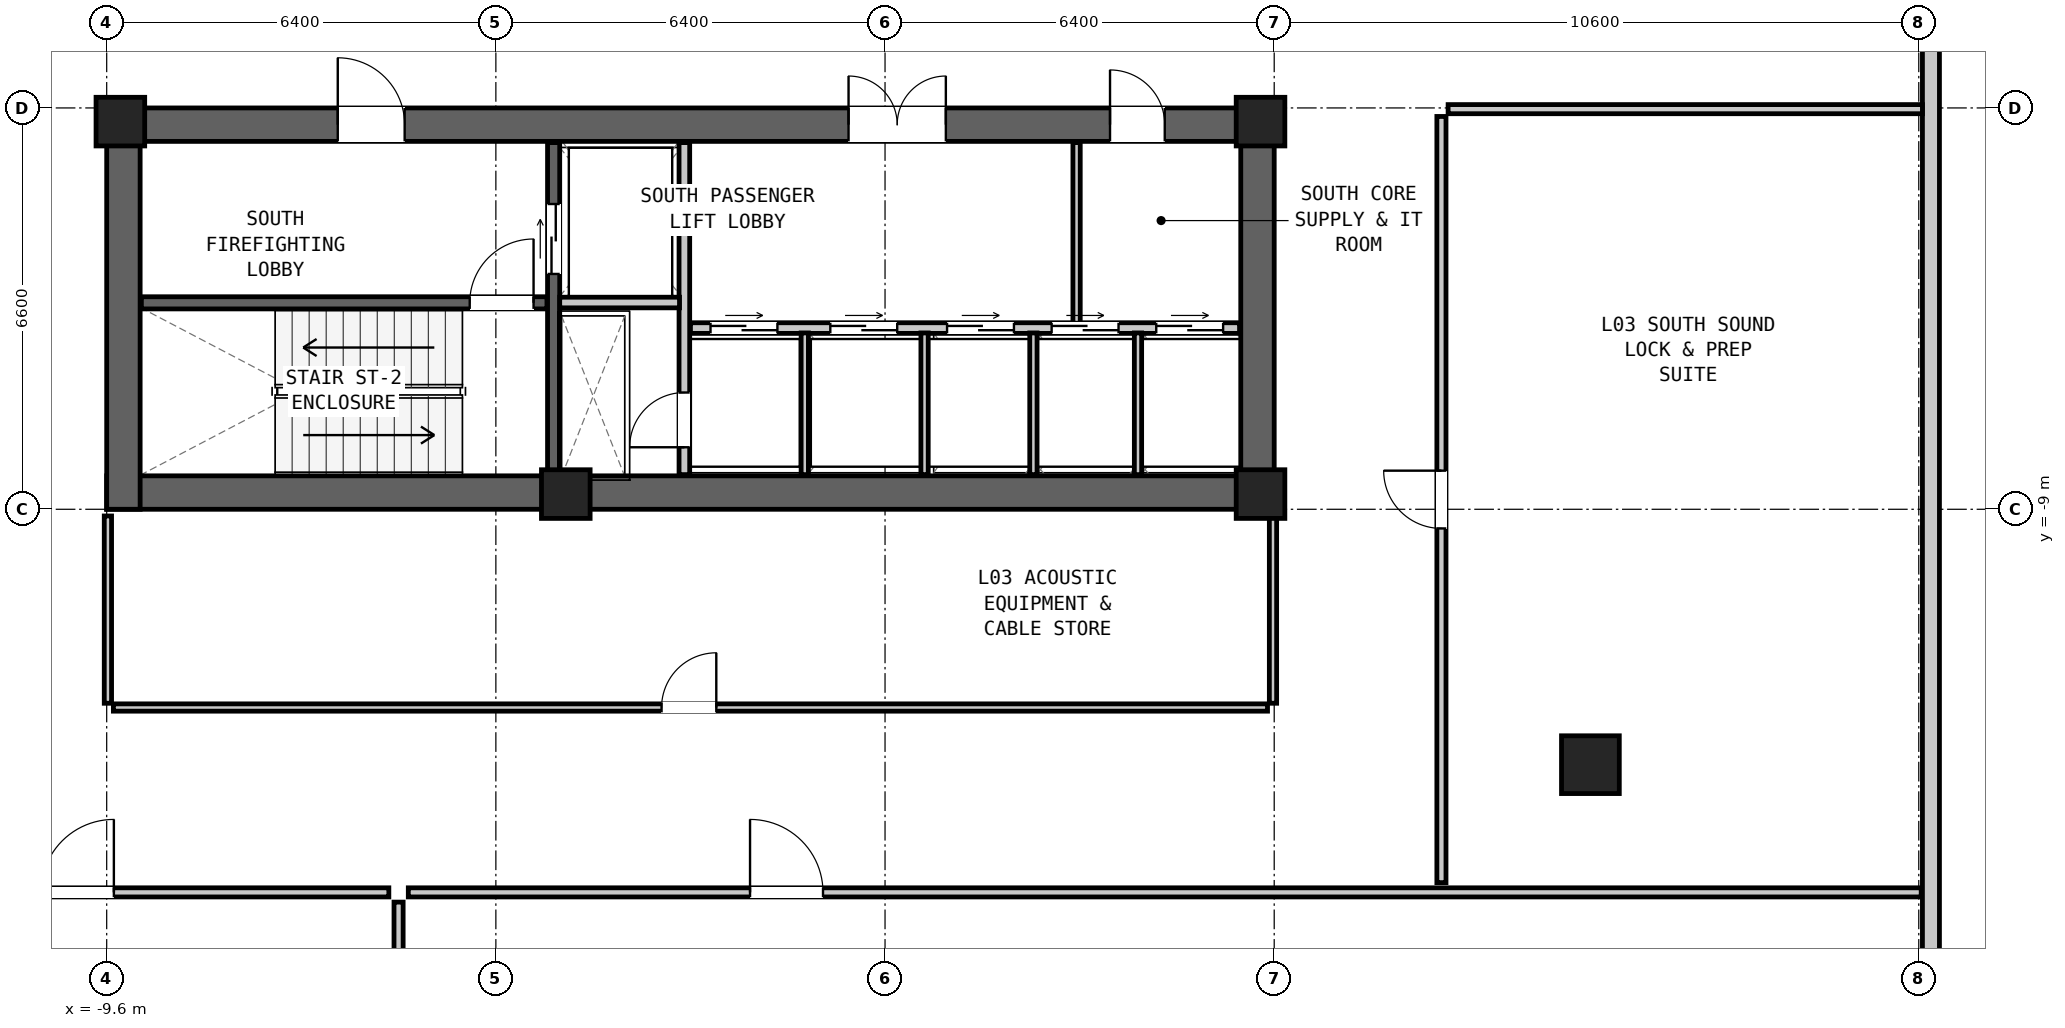
"""IFC4 building model, lengths in metres.
Left out: names, types, materials, properties, quantities, classifications, styles, units other than length and angle.
Written with IfcOpenShell. Run it as: python <this file> out.ifc"""

import sys

from ifc_helpers import new_model, si_unit, direction, frame, frame_2d, origin, origin_2d, place, context, subcontext, project, spatial, rectangle, hollow_rectangle, extrude, element, fill, save


model = new_model("IFC4")
c1 = context("Model", 3, precision=1e-05, world=origin(), true_north=direction((0.0, 1.0)))
c2 = subcontext(c1, "Body", "Model", "MODEL_VIEW")
j1 = project(units=[si_unit("LENGTHUNIT", "METRE"), si_unit("PLANEANGLEUNIT", "RADIAN")], contexts=[c1])
p1 = place(None, origin())
s1 = spatial("IfcSite", under=j1, at=p1, CompositionType="ELEMENT")
p2 = place(p1, origin())
s2 = spatial("IfcBuilding", under=s1, at=p2, CompositionType="ELEMENT")
p3 = place(p2, frame((0.0, 0.0, 13.5)))
s3 = spatial("IfcBuildingStorey", under=s2, at=p3, CompositionType="ELEMENT", Elevation=13.5)
p4 = place(p3, frame((-9.6, -8.725, 0.0), z_axis=(0.0, 0.0, 1.0), x_axis=(1.0, 0.0, 0.0)))
e1 = element("IfcWall", 1, at=p4, inside=s3, PredefinedType="SHEAR", context=c2, shape_type="SweptSolid", body=[
    extrude(rectangle(XDim=19.2, YDim=0.55, at=frame_2d((9.6, 0.0))), origin(), (0.0, 0.0, 1.0), 4.2),
])
p5 = place(p3, frame((-9.6, -2.675, 0.0), z_axis=(0.0, 0.0, 1.0), x_axis=(1.0, 0.0, 0.0)))
e2 = element("IfcWall", 2, at=p5, inside=s3, PredefinedType="SHEAR", context=c2, shape_type="SweptSolid", body=[
    extrude(rectangle(XDim=19.2, YDim=0.55, at=frame_2d((9.6, 0.0))), origin(), (0.0, 0.0, 1.0), 4.2),
])
p6 = place(p5, frame((3.8, 0.0, 0.0)))
e3 = element("IfcOpeningElement", 3, at=p6, cuts=e2, PredefinedType="OPENING", context=c2, shape_type="SweptSolid", body=[
    extrude(rectangle(XDim=1.1, YDim=2.08, at=frame_2d((0.55, 1.04))), frame((0.0, 0.287, 0.0), z_axis=(0.0, -1.0, 0.0), x_axis=(1.0, 0.0, 0.0)), (0.0, 0.0, 1.0), 0.574),
])
p7 = place(p5, frame((12.2, 0.0, 0.0)))
e4 = element("IfcOpeningElement", 4, at=p7, cuts=e2, PredefinedType="OPENING", context=c2, shape_type="SweptSolid", body=[
    extrude(rectangle(XDim=1.6, YDim=2.12, at=frame_2d((0.8, 1.06))), frame((0.0, 0.287, 0.0), z_axis=(0.0, -1.0, 0.0), x_axis=(1.0, 0.0, 0.0)), (0.0, 0.0, 1.0), 0.574),
])
p8 = place(p5, frame((16.5, 0.0, 0.0)))
e5 = element("IfcOpeningElement", 5, at=p8, cuts=e2, PredefinedType="OPENING", context=c2, shape_type="SweptSolid", body=[
    extrude(rectangle(XDim=0.9, YDim=2.05, at=frame_2d((0.45, 1.025))), frame((0.0, 0.287, 0.0), z_axis=(0.0, -1.0, 0.0), x_axis=(1.0, 0.0, 0.0)), (0.0, 0.0, 1.0), 0.574),
])
for number, where, z_axis, x_axis in (
    (6, (-9.325, -9.0, 0.0), (0.0, 0.0, 1.0), (0.0, 1.0, 0.0)),
    (7, (9.325, -9.0, 0.0), (0.0, 0.0, 1.0), (0.0, 1.0, 0.0)),
):
    element("IfcWall", number, at=place(p3, frame(where, z_axis=z_axis, x_axis=x_axis)), inside=s3, PredefinedType="SHEAR", context=c2, shape_type="SweptSolid", body=[
        extrude(rectangle(XDim=6.6, YDim=0.55, at=frame_2d((3.3, 0.0))), origin(), (0.0, 0.0, 1.0), 4.2),
    ])
p9 = place(p3, frame((14.8, -13.2, 0.0), z_axis=(0.0, 0.0, 1.0), x_axis=(1.0, 0.0, 0.0)))
e8 = element("IfcColumn", 8, at=p9, inside=s3, PredefinedType="COLUMN", context=c2, shape_type="SweptSolid", body=[
    extrude(hollow_rectangle(XDim=0.95, YDim=0.95, WallThickness=0.06, at=origin_2d()), origin(), (0.0, 0.0, 1.0), 4.2),
])
for number, where, z_axis, x_axis in (
    (9, (-9.375, -2.625, 0.0), (0.0, 0.0, 1.0), (1.0, 0.0, 0.0)),
    (10, (9.375, -2.625, 0.0), (0.0, 0.0, 1.0), (1.0, 0.0, 0.0)),
    (11, (-2.05, -8.75, 0.0), (0.0, 0.0, 1.0), (1.0, 0.0, 0.0)),
    (12, (9.375, -8.75, 0.0), (0.0, 0.0, 1.0), (1.0, 0.0, 0.0)),
):
    element("IfcColumn", number, at=place(p3, frame(where, z_axis=z_axis, x_axis=x_axis)), inside=s3, PredefinedType="COLUMN", context=c2, shape_type="SweptSolid", body=[
        extrude(rectangle(XDim=0.8, YDim=0.8, at=origin_2d()), origin(), (0.0, 0.0, 1.0), 4.2),
    ])
p10 = place(p3, frame((-9.03, -5.605, 0.0), z_axis=(0.0, 0.0, 1.0), x_axis=(1.0, 0.0, 0.0)))
e13 = element("IfcWall", 13, at=p10, inside=s3, PredefinedType="SHEAR", context=c2, shape_type="SweptSolid", body=[
    extrude(rectangle(XDim=6.67, YDim=0.2, at=frame_2d((3.335, 0.0))), origin(), (0.0, 0.0, 1.0), 3.88),
])
p11 = place(p10, frame((5.4, 0.0, 0.0)))
e14 = element("IfcOpeningElement", 14, at=p11, cuts=e13, PredefinedType="OPENING", context=c2, shape_type="SweptSolid", body=[
    extrude(rectangle(XDim=1.05, YDim=2.08, at=frame_2d((0.525, 1.04))), frame((0.0, 0.112, 0.0), z_axis=(0.0, -1.0, 0.0), x_axis=(1.0, 0.0, 0.0)), (0.0, 0.0, 1.0), 0.224),
])
p12 = place(p3, frame((-2.25, -8.43, 0.0), z_axis=(0.0, 0.0, 1.0), x_axis=(0.0, 1.0, 0.0)))
e15 = element("IfcWall", 15, at=p12, inside=s3, PredefinedType="SHEAR", context=c2, shape_type="SweptSolid", body=[
    extrude(rectangle(XDim=5.46, YDim=0.2, at=frame_2d((2.73, 0.0))), origin(), (0.0, 0.0, 1.0), 3.88),
])
p13 = place(p12, frame((3.3, 0.0, 0.0)))
e16 = element("IfcOpeningElement", 16, at=p13, cuts=e15, PredefinedType="OPENING", context=c2, shape_type="SweptSolid", body=[
    extrude(rectangle(XDim=1.15, YDim=2.08, at=frame_2d((0.575, 1.04))), frame((0.0, 0.112, 0.0), z_axis=(0.0, -1.0, 0.0), x_axis=(1.0, 0.0, 0.0)), (0.0, 0.0, 1.0), 0.224),
])
p14 = place(p3, frame((-0.1, -8.43, 0.0), z_axis=(0.0, 0.0, 1.0), x_axis=(0.0, 1.0, 0.0)))
e17 = element("IfcWall", 17, at=p14, inside=s3, PredefinedType="PARTITIONING", context=c2, shape_type="SweptSolid", body=[
    extrude(rectangle(XDim=5.46, YDim=0.175, at=frame_2d((2.73, 0.0))), origin(), (0.0, 0.0, 1.0), 3.88),
])
p15 = place(p14, frame((0.45, 0.0, 0.0)))
e18 = element("IfcOpeningElement", 18, at=p15, cuts=e17, PredefinedType="OPENING", context=c2, shape_type="SweptSolid", body=[
    extrude(rectangle(XDim=0.9, YDim=2.05, at=frame_2d((0.45, 1.025))), frame((0.0, 0.1, 0.0), z_axis=(0.0, -1.0, 0.0), x_axis=(1.0, 0.0, 0.0)), (0.0, 0.0, 1.0), 0.199),
])
p16 = place(p3, frame((-2.15, -5.6, 0.0), z_axis=(0.0, 0.0, 1.0), x_axis=(1.0, 0.0, 0.0)))
e19 = element("IfcWall", 19, at=p16, inside=s3, PredefinedType="PARTITIONING", context=c2, shape_type="SweptSolid", body=[
    extrude(rectangle(XDim=1.97, YDim=0.175, at=frame_2d((0.985, 0.0))), origin(), (0.0, 0.0, 1.0), 3.88),
])
p17 = place(p3, frame((0.0, -6.02, 0.0), z_axis=(0.0, 0.0, 1.0), x_axis=(1.0, 0.0, 0.0)))
e20 = element("IfcWall", 20, at=p17, inside=s3, PredefinedType="PARTITIONING", context=c2, shape_type="SweptSolid", body=[
    extrude(rectangle(XDim=9.03, YDim=0.175, at=frame_2d((4.515, 0.0))), origin(), (0.0, 0.0, 1.0), 3.88),
])
p18 = place(p17, frame((0.33, 0.0, 0.0)))
e21 = element("IfcOpeningElement", 21, at=p18, cuts=e20, PredefinedType="OPENING", context=c2, shape_type="SweptSolid", body=[
    extrude(rectangle(XDim=1.1, YDim=2.06, at=frame_2d((0.55, 1.03))), frame((0.0, 0.1, 0.0), z_axis=(0.0, -1.0, 0.0), x_axis=(1.0, 0.0, 0.0)), (0.0, 0.0, 1.0), 0.199),
])
p19 = place(p17, frame((2.3, 0.0, 0.0)))
e22 = element("IfcOpeningElement", 22, at=p19, cuts=e20, PredefinedType="OPENING", context=c2, shape_type="SweptSolid", body=[
    extrude(rectangle(XDim=1.1, YDim=2.06, at=frame_2d((0.55, 1.03))), frame((0.0, 0.1, 0.0), z_axis=(0.0, -1.0, 0.0), x_axis=(1.0, 0.0, 0.0)), (0.0, 0.0, 1.0), 0.199),
])
p20 = place(p17, frame((4.22, 0.0, 0.0)))
e23 = element("IfcOpeningElement", 23, at=p20, cuts=e20, PredefinedType="OPENING", context=c2, shape_type="SweptSolid", body=[
    extrude(rectangle(XDim=1.1, YDim=2.06, at=frame_2d((0.55, 1.03))), frame((0.0, 0.1, 0.0), z_axis=(0.0, -1.0, 0.0), x_axis=(1.0, 0.0, 0.0)), (0.0, 0.0, 1.0), 0.199),
])
p21 = place(p17, frame((5.94, 0.0, 0.0)))
e24 = element("IfcOpeningElement", 24, at=p21, cuts=e20, PredefinedType="OPENING", context=c2, shape_type="SweptSolid", body=[
    extrude(rectangle(XDim=1.1, YDim=2.06, at=frame_2d((0.55, 1.03))), frame((0.0, 0.1, 0.0), z_axis=(0.0, -1.0, 0.0), x_axis=(1.0, 0.0, 0.0)), (0.0, 0.0, 1.0), 0.199),
])
p22 = place(p17, frame((7.66, 0.0, 0.0)))
e25 = element("IfcOpeningElement", 25, at=p22, cuts=e20, PredefinedType="OPENING", context=c2, shape_type="SweptSolid", body=[
    extrude(rectangle(XDim=1.1, YDim=2.06, at=frame_2d((0.55, 1.03))), frame((0.0, 0.1, 0.0), z_axis=(0.0, -1.0, 0.0), x_axis=(1.0, 0.0, 0.0)), (0.0, 0.0, 1.0), 0.199),
])
for number, where, z_axis, x_axis in (
    (26, (1.88, -8.43, 0.0), (0.0, 0.0, 1.0), (0.0, 1.0, 0.0)),
    (27, (3.85, -8.43, 0.0), (0.0, 0.0, 1.0), (0.0, 1.0, 0.0)),
    (28, (5.64, -8.43, 0.0), (0.0, 0.0, 1.0), (0.0, 1.0, 0.0)),
    (29, (7.36, -8.43, 0.0), (0.0, 0.0, 1.0), (0.0, 1.0, 0.0)),
):
    element("IfcWall", number, at=place(p3, frame(where, z_axis=z_axis, x_axis=x_axis)), inside=s3, PredefinedType="PARTITIONING", context=c2, shape_type="SweptSolid", body=[
        extrude(rectangle(XDim=2.33, YDim=0.12, at=frame_2d((1.165, 0.0))), origin(), (0.0, 0.0, 1.0), 3.88),
    ])
p23 = place(p3, frame((6.35, -5.94, 0.0), z_axis=(0.0, 0.0, 1.0), x_axis=(0.0, 1.0, 0.0)))
e30 = element("IfcWall", 30, at=p23, inside=s3, PredefinedType="PARTITIONING", context=c2, shape_type="SweptSolid", body=[
    extrude(rectangle(XDim=2.97, YDim=0.12, at=frame_2d((1.485, 0.0))), origin(), (0.0, 0.0, 1.0), 3.88),
])
p24 = place(p3, frame((20.4, -25.74, 0.0), z_axis=(0.0, 0.0, 1.0), x_axis=(0.0, 1.0, 0.0)))
e31 = element("IfcWall", 31, at=p24, inside=s3, PredefinedType="MOVABLE", context=c2, shape_type="SweptSolid", body=[
    extrude(rectangle(XDim=51.48, YDim=0.28, at=frame_2d((25.74, 0.0))), origin(), (0.0, 0.0, 1.0), 3.253),
])
p25 = place(p24, frame((25.255, 0.0, 0.0)))
e32 = element("IfcOpeningElement", 32, at=p25, cuts=e31, PredefinedType="OPENING", context=c2, shape_type="SweptSolid", body=[
    extrude(rectangle(XDim=2.0, YDim=2.14, at=frame_2d((1.0, 1.07))), frame((0.0, 0.152, 0.0), z_axis=(0.0, -1.0, 0.0), x_axis=(1.0, 0.0, 0.0)), (0.0, 0.0, 1.0), 0.304),
])
p26 = place(p3, frame((-28.24, -15.3, 0.0), z_axis=(0.0, 0.0, 1.0), x_axis=(1.0, 0.0, 0.0)))
e33 = element("IfcWall", 33, at=p26, inside=s3, PredefinedType="PARTITIONING", context=c2, shape_type="SweptSolid", body=[
    extrude(rectangle(XDim=23.28, YDim=0.15, at=frame_2d((11.64, 0.0))), origin(), (0.0, 0.0, 1.0), 3.88),
])
p27 = place(p26, frame((17.558, 0.0, 0.0)))
e34 = element("IfcOpeningElement", 34, at=p27, cuts=e33, PredefinedType="OPENING", context=c2, shape_type="SweptSolid", body=[
    extrude(rectangle(XDim=1.2, YDim=2.1, at=frame_2d((0.6, 1.05))), frame((0.0, 0.087, 0.0), z_axis=(0.0, -1.0, 0.0), x_axis=(1.0, 0.0, 0.0)), (0.0, 0.0, 1.0), 0.174),
])
p28 = place(p3, frame((-4.64, -15.3, 0.0), z_axis=(0.0, 0.0, 1.0), x_axis=(1.0, 0.0, 0.0)))
e35 = element("IfcWall", 35, at=p28, inside=s3, PredefinedType="PARTITIONING", context=c2, shape_type="SweptSolid", body=[
    extrude(rectangle(XDim=24.88, YDim=0.15, at=frame_2d((12.44, 0.0))), origin(), (0.0, 0.0, 1.0), 3.88),
])
p29 = place(p28, frame((5.62, 0.0, 0.0)))
e36 = element("IfcOpeningElement", 36, at=p29, cuts=e35, PredefinedType="OPENING", context=c2, shape_type="SweptSolid", body=[
    extrude(rectangle(XDim=1.2, YDim=2.1, at=frame_2d((0.6, 1.05))), frame((0.0, 0.087, 0.0), z_axis=(0.0, -1.0, 0.0), x_axis=(1.0, 0.0, 0.0)), (0.0, 0.0, 1.0), 0.174),
])
p30 = place(p3, frame((-4.8, -25.74, 0.0), z_axis=(0.0, 0.0, 1.0), x_axis=(0.0, 1.0, 0.0)))
e37 = element("IfcWall", 37, at=p30, inside=s3, PredefinedType="PARTITIONING", context=c2, shape_type="SweptSolid", body=[
    extrude(rectangle(XDim=10.28, YDim=0.15, at=frame_2d((5.14, 0.0))), origin(), (0.0, 0.0, 1.0), 3.88),
])
p31 = place(p3, frame((12.35, -15.14, 0.0), z_axis=(0.0, 0.0, 1.0), x_axis=(0.0, 1.0, 0.0)))
e38 = element("IfcWall", 38, at=p31, inside=s3, PredefinedType="PARTITIONING", context=c2, shape_type="SweptSolid", body=[
    extrude(rectangle(XDim=12.6, YDim=0.15, at=frame_2d((6.3, 0.0))), origin(), (0.0, 0.0, 1.0), 3.88),
])
p32 = place(p31, frame((5.825, 0.0, 0.0)))
e39 = element("IfcOpeningElement", 39, at=p32, cuts=e38, PredefinedType="OPENING", context=c2, shape_type="SweptSolid", body=[
    extrude(rectangle(XDim=0.95, YDim=2.1, at=frame_2d((0.475, 1.05))), frame((0.0, 0.087, 0.0), z_axis=(0.0, -1.0, 0.0), x_axis=(1.0, 0.0, 0.0)), (0.0, 0.0, 1.0), 0.174),
])
p33 = place(p3, frame((12.46, -2.42, 0.0), z_axis=(0.0, 0.0, 1.0), x_axis=(1.0, 0.0, 0.0)))
e40 = element("IfcWall", 40, at=p33, inside=s3, PredefinedType="PARTITIONING", context=c2, shape_type="SweptSolid", body=[
    extrude(rectangle(XDim=7.8, YDim=0.15, at=frame_2d((3.9, 0.0))), origin(), (0.0, 0.0, 1.0), 2.742),
])
p34 = place(p3, frame((-9.49, -12.26, 0.0), z_axis=(0.0, 0.0, 1.0), x_axis=(1.0, 0.0, 0.0)))
e41 = element("IfcWall", 41, at=p34, inside=s3, PredefinedType="PARTITIONING", context=c2, shape_type="SweptSolid", body=[
    extrude(rectangle(XDim=18.98, YDim=0.12, at=frame_2d((9.49, 0.0))), origin(), (0.0, 0.0, 1.0), 3.88),
])
p35 = place(p34, frame((9.015, 0.0, 0.0)))
e42 = element("IfcOpeningElement", 42, at=p35, cuts=e41, PredefinedType="OPENING", context=c2, shape_type="SweptSolid", body=[
    extrude(rectangle(XDim=0.9, YDim=2.05, at=frame_2d((0.45, 1.025))), frame((0.0, 0.072, 0.0), z_axis=(0.0, -1.0, 0.0), x_axis=(1.0, 0.0, 0.0)), (0.0, 0.0, 1.0), 0.144),
])
for number, where, z_axis, x_axis in (
    (43, (-9.58, -12.19, 0.0), (0.0, 0.0, 1.0), (0.0, 1.0, 0.0)),
    (44, (9.58, -12.19, 0.0), (0.0, 0.0, 1.0), (0.0, 1.0, 0.0)),
):
    element("IfcWall", number, at=place(p3, frame(where, z_axis=z_axis, x_axis=x_axis)), inside=s3, PredefinedType="PARTITIONING", context=c2, shape_type="SweptSolid", body=[
        extrude(rectangle(XDim=3.08, YDim=0.12, at=frame_2d((1.54, 0.0))), origin(), (0.0, 0.0, 1.0), 3.88),
    ])
p36 = place(p11, origin())
e45 = element("IfcDoor", 45, at=p36, inside=s3, OperationType="SINGLE_SWING_RIGHT", PredefinedType="DOOR", context=c2, shape_type="SweptSolid", body=[
    extrude(rectangle(XDim=1.05, YDim=2.08, at=frame_2d((0.525, 1.04))), frame((0.0, 0.025, 0.0), z_axis=(0.0, -1.0, 0.0), x_axis=(1.0, 0.0, 0.0)), (0.0, 0.0, 1.0), 0.05),
])
fill(e14, e45)
p37 = place(p6, origin())
e46 = element("IfcDoor", 46, at=p37, inside=s3, OperationType="SINGLE_SWING_LEFT", PredefinedType="DOOR", context=c2, shape_type="SweptSolid", body=[
    extrude(rectangle(XDim=1.1, YDim=2.08, at=frame_2d((0.55, 1.04))), frame((0.0, 0.025, 0.0), z_axis=(0.0, -1.0, 0.0), x_axis=(1.0, 0.0, 0.0)), (0.0, 0.0, 1.0), 0.05),
])
fill(e3, e46)
p38 = place(p13, origin())
e47 = element("IfcDoor", 47, at=p38, inside=s3, OperationType="DOUBLE_DOOR_SLIDING", PredefinedType="DOOR", context=c2, shape_type="SweptSolid", body=[
    extrude(rectangle(XDim=1.15, YDim=2.08, at=frame_2d((0.575, 1.04))), frame((0.0, 0.025, 0.0), z_axis=(0.0, -1.0, 0.0), x_axis=(1.0, 0.0, 0.0)), (0.0, 0.0, 1.0), 0.05),
])
fill(e16, e47)
p39 = place(p15, origin())
e48 = element("IfcDoor", 48, at=p39, inside=s3, OperationType="SINGLE_SWING_LEFT", PredefinedType="DOOR", context=c2, shape_type="SweptSolid", body=[
    extrude(rectangle(XDim=0.9, YDim=2.05, at=frame_2d((0.45, 1.025))), frame((0.0, 0.025, 0.0), z_axis=(0.0, -1.0, 0.0), x_axis=(1.0, 0.0, 0.0)), (0.0, 0.0, 1.0), 0.05),
])
fill(e18, e48)
p40 = place(p7, origin())
e49 = element("IfcDoor", 49, at=p40, inside=s3, OperationType="DOUBLE_DOOR_SINGLE_SWING", PredefinedType="DOOR", context=c2, shape_type="SweptSolid", body=[
    extrude(rectangle(XDim=1.6, YDim=2.12, at=frame_2d((0.8, 1.06))), frame((0.0, 0.025, 0.0), z_axis=(0.0, -1.0, 0.0), x_axis=(1.0, 0.0, 0.0)), (0.0, 0.0, 1.0), 0.05),
])
fill(e4, e49)
p41 = place(p8, origin())
e50 = element("IfcDoor", 50, at=p41, inside=s3, OperationType="SINGLE_SWING_LEFT", PredefinedType="DOOR", context=c2, shape_type="SweptSolid", body=[
    extrude(rectangle(XDim=0.9, YDim=2.05, at=frame_2d((0.45, 1.025))), frame((0.0, 0.025, 0.0), z_axis=(0.0, -1.0, 0.0), x_axis=(1.0, 0.0, 0.0)), (0.0, 0.0, 1.0), 0.05),
])
fill(e5, e50)
p42 = place(p27, origin())
e51 = element("IfcDoor", 51, at=p42, inside=s3, OperationType="SINGLE_SWING_RIGHT", PredefinedType="DOOR", context=c2, shape_type="SweptSolid", body=[
    extrude(rectangle(XDim=1.2, YDim=2.1, at=frame_2d((0.6, 1.05))), frame((0.0, 0.025, 0.0), z_axis=(0.0, -1.0, 0.0), x_axis=(1.0, 0.0, 0.0)), (0.0, 0.0, 1.0), 0.05),
])
fill(e34, e51)
p43 = place(p29, origin())
e52 = element("IfcDoor", 52, at=p43, inside=s3, OperationType="SINGLE_SWING_LEFT", PredefinedType="DOOR", context=c2, shape_type="SweptSolid", body=[
    extrude(rectangle(XDim=1.2, YDim=2.1, at=frame_2d((0.6, 1.05))), frame((0.0, 0.025, 0.0), z_axis=(0.0, -1.0, 0.0), x_axis=(1.0, 0.0, 0.0)), (0.0, 0.0, 1.0), 0.05),
])
fill(e36, e52)
p44 = place(p32, origin())
e53 = element("IfcDoor", 53, at=p44, inside=s3, OperationType="SINGLE_SWING_RIGHT", PredefinedType="DOOR", context=c2, shape_type="SweptSolid", body=[
    extrude(rectangle(XDim=0.95, YDim=2.1, at=frame_2d((0.475, 1.05))), frame((0.0, 0.025, 0.0), z_axis=(0.0, -1.0, 0.0), x_axis=(1.0, 0.0, 0.0)), (0.0, 0.0, 1.0), 0.05),
])
fill(e39, e53)
p45 = place(p35, origin())
e54 = element("IfcDoor", 54, at=p45, inside=s3, OperationType="SINGLE_SWING_RIGHT", PredefinedType="DOOR", context=c2, shape_type="SweptSolid", body=[
    extrude(rectangle(XDim=0.9, YDim=2.05, at=frame_2d((0.45, 1.025))), frame((0.0, 0.025, 0.0), z_axis=(0.0, -1.0, 0.0), x_axis=(1.0, 0.0, 0.0)), (0.0, 0.0, 1.0), 0.05),
])
fill(e42, e54)
p46 = place(p18, origin())
e55 = element("IfcDoor", 55, at=p46, inside=s3, OperationType="DOUBLE_DOOR_SLIDING", PredefinedType="DOOR", context=c2, shape_type="SweptSolid", body=[
    extrude(rectangle(XDim=1.1, YDim=2.06, at=frame_2d((0.55, 1.03))), frame((0.0, 0.025, 0.0), z_axis=(0.0, -1.0, 0.0), x_axis=(1.0, 0.0, 0.0)), (0.0, 0.0, 1.0), 0.05),
])
fill(e21, e55)
p47 = place(p19, origin())
e56 = element("IfcDoor", 56, at=p47, inside=s3, OperationType="DOUBLE_DOOR_SLIDING", PredefinedType="DOOR", context=c2, shape_type="SweptSolid", body=[
    extrude(rectangle(XDim=1.1, YDim=2.06, at=frame_2d((0.55, 1.03))), frame((0.0, 0.025, 0.0), z_axis=(0.0, -1.0, 0.0), x_axis=(1.0, 0.0, 0.0)), (0.0, 0.0, 1.0), 0.05),
])
fill(e22, e56)
p48 = place(p20, origin())
e57 = element("IfcDoor", 57, at=p48, inside=s3, OperationType="DOUBLE_DOOR_SLIDING", PredefinedType="DOOR", context=c2, shape_type="SweptSolid", body=[
    extrude(rectangle(XDim=1.1, YDim=2.06, at=frame_2d((0.55, 1.03))), frame((0.0, 0.025, 0.0), z_axis=(0.0, -1.0, 0.0), x_axis=(1.0, 0.0, 0.0)), (0.0, 0.0, 1.0), 0.05),
])
fill(e23, e57)
p49 = place(p21, origin())
e58 = element("IfcDoor", 58, at=p49, inside=s3, OperationType="DOUBLE_DOOR_SLIDING", PredefinedType="DOOR", context=c2, shape_type="SweptSolid", body=[
    extrude(rectangle(XDim=1.1, YDim=2.06, at=frame_2d((0.55, 1.03))), frame((0.0, 0.025, 0.0), z_axis=(0.0, -1.0, 0.0), x_axis=(1.0, 0.0, 0.0)), (0.0, 0.0, 1.0), 0.05),
])
fill(e24, e58)
p50 = place(p22, origin())
e59 = element("IfcDoor", 59, at=p50, inside=s3, OperationType="DOUBLE_DOOR_SLIDING", PredefinedType="DOOR", context=c2, shape_type="SweptSolid", body=[
    extrude(rectangle(XDim=1.1, YDim=2.06, at=frame_2d((0.55, 1.03))), frame((0.0, 0.025, 0.0), z_axis=(0.0, -1.0, 0.0), x_axis=(1.0, 0.0, 0.0)), (0.0, 0.0, 1.0), 0.05),
])
fill(e25, e59)
save(model, sys.argv[1])
